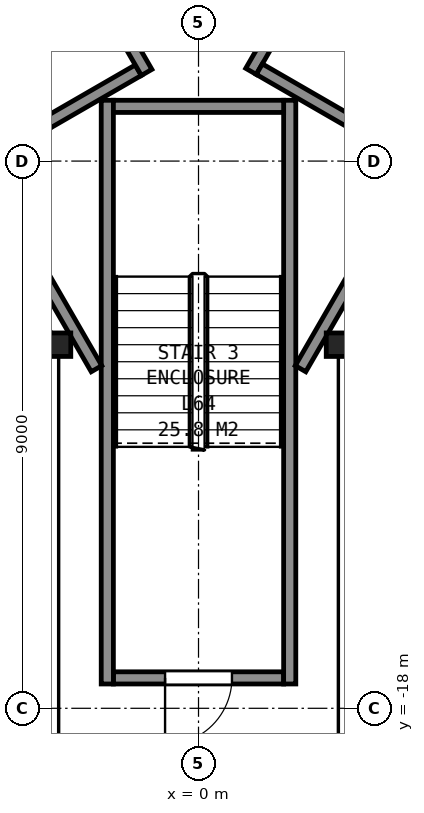
"""IFC4 building model, lengths in metres.
Left out: names, types, materials, properties, quantities, classifications, styles, units other than length and angle.
Written with IfcOpenShell. Run it as: python <this file> out.ifc"""

import sys

from ifc_helpers import new_model, si_unit, direction, frame, frame_2d, origin, origin_2d, place, context, subcontext, project, spatial, rectangle, i_section, extrude, element, fill, save


model = new_model("IFC4")
c1 = context("Model", 3, precision=1e-05, world=origin(), true_north=direction((0.0, 1.0)))
c2 = subcontext(c1, "Body", "Model", "MODEL_VIEW")
j1 = project(units=[si_unit("LENGTHUNIT", "METRE"), si_unit("PLANEANGLEUNIT", "RADIAN")], contexts=[c1])
p1 = place(None, origin())
s1 = spatial("IfcSite", under=j1, at=p1, CompositionType="ELEMENT")
p2 = place(p1, origin())
s2 = spatial("IfcBuilding", under=s1, at=p2, CompositionType="ELEMENT")
p3 = place(p2, frame((0.0, 0.0, 254.5)))
s3 = spatial("IfcBuildingStorey", under=s2, at=p3, CompositionType="ELEMENT", Elevation=254.5)
for number, where, z_axis, x_axis in (
    (1, (-2.3, -12.02, 0.0), (0.0, 0.0, 1.0), (1.0, 0.0, 0.0)),
    (2, (2.3, -12.02, 0.0), (0.0, 0.0, 1.0), (1.0, 0.0, 0.0)),
):
    element("IfcColumn", number, at=place(p3, frame(where, z_axis=z_axis, x_axis=x_axis)), inside=s3, PredefinedType="COLUMN", context=c2, shape_type="SweptSolid", body=[
        extrude(i_section(OverallWidth=0.399, OverallDepth=0.386, WebThickness=0.021, FlangeThickness=0.033, FilletRadius=0.015, at=origin_2d()), origin(), (0.0, 0.0, 1.0), 3.65),
    ])
p4 = place(p3, frame((-1.4, -17.5, 0.0), z_axis=(0.0, 0.0, 1.0), x_axis=(1.0, 0.0, 0.0)))
e3 = element("IfcWall", 3, at=p4, inside=s3, PredefinedType="PARTITIONING", context=c2, shape_type="SweptSolid", body=[
    extrude(rectangle(XDim=2.8, YDim=0.2, at=frame_2d((1.4, 0.0))), origin(), (0.0, 0.0, 1.0), 3.45),
])
p5 = place(p4, frame((0.85, 0.0, 0.0)))
e4 = element("IfcOpeningElement", 4, at=p5, cuts=e3, PredefinedType="OPENING", context=c2, shape_type="SweptSolid", body=[
    extrude(rectangle(XDim=1.1, YDim=2.1, at=frame_2d((0.55, 1.05))), frame((0.0, 0.11, 0.0), z_axis=(0.0, -1.0, 0.0), x_axis=(1.0, 0.0, 0.0)), (0.0, 0.0, 1.0), 0.22),
])
for number, where, z_axis, x_axis in (
    (5, (1.5, -8.0, 0.0), (0.0, 0.0, 1.0), (0.0, -1.0, 0.0)),
    (6, (-1.5, -8.0, 0.0), (0.0, 0.0, 1.0), (0.0, -1.0, 0.0)),
):
    element("IfcWall", number, at=place(p3, frame(where, z_axis=z_axis, x_axis=x_axis)), inside=s3, PredefinedType="PARTITIONING", context=c2, shape_type="SweptSolid", body=[
        extrude(rectangle(XDim=9.6, YDim=0.2, at=frame_2d((4.8, 0.0))), origin(), (0.0, 0.0, 1.0), 3.45),
    ])
p6 = place(p3, frame((-1.4, -8.1, 0.0), z_axis=(0.0, 0.0, 1.0), x_axis=(1.0, 0.0, 0.0)))
e7 = element("IfcWall", 7, at=p6, inside=s3, PredefinedType="PARTITIONING", context=c2, shape_type="SweptSolid", body=[
    extrude(rectangle(XDim=2.8, YDim=0.2, at=frame_2d((1.4, 0.0))), origin(), (0.0, 0.0, 1.0), 3.45),
])
p7 = place(p3, frame((-2.505, -8.38, 0.0), z_axis=(0.0, 0.0, 1.0), x_axis=(0.866002029911, 0.500040482552, 0.0)))
e8 = element("IfcWall", 8, at=p7, inside=s3, PredefinedType="PARTITIONING", context=c2, shape_type="SweptSolid", body=[
    extrude(rectangle(XDim=1.75, YDim=0.2, at=frame_2d((0.875, 0.0))), origin(), (0.0, 0.0, 1.0), 3.7),
])
p8 = place(p3, frame((-4.62, -7.118, 0.0), z_axis=(0.0, 0.0, 1.0), x_axis=(0.866039495442, 0.49997559174, 0.0)))
e9 = element("IfcWall", 9, at=p8, inside=s3, PredefinedType="PARTITIONING", context=c2, shape_type="SweptSolid", body=[
    extrude(rectangle(XDim=2.95, YDim=0.2, at=frame_2d((1.475, 0.0))), origin(), (0.0, 0.0, 1.0), 3.7),
])
p9 = place(p3, frame((0.863, -7.525, 0.0), z_axis=(0.0, 0.0, 1.0), x_axis=(0.499990435942, 0.866030925526, 0.0)))
e10 = element("IfcWall", 10, at=p9, inside=s3, PredefinedType="PARTITIONING", context=c2, shape_type="SweptSolid", body=[
    extrude(rectangle(XDim=2.55, YDim=0.2, at=frame_2d((1.275, 0.0))), origin(), (0.0, 0.0, 1.0), 3.7),
])
p10 = place(p3, frame((-0.853, -7.542, 0.0), z_axis=(0.0, 0.0, 1.0), x_axis=(-0.500016218704, 0.866016039709, 0.0)))
e11 = element("IfcWall", 11, at=p10, inside=s3, PredefinedType="PARTITIONING", context=c2, shape_type="SweptSolid", body=[
    extrude(rectangle(XDim=2.35, YDim=0.2, at=frame_2d((1.175, 0.0))), origin(), (0.0, 0.0, 1.0), 3.7),
])
p11 = place(p3, frame((2.515, -8.363, 0.0), z_axis=(0.0, 0.0, 1.0), x_axis=(-0.866036909293, 0.499980071345, 0.0)))
e12 = element("IfcWall", 12, at=p11, inside=s3, PredefinedType="PARTITIONING", context=c2, shape_type="SweptSolid", body=[
    extrude(rectangle(XDim=1.75, YDim=0.2, at=frame_2d((0.875, 0.0))), origin(), (0.0, 0.0, 1.0), 3.7),
])
p12 = place(p3, frame((-4.655, -7.257, 0.0), z_axis=(0.0, 0.0, 1.0), x_axis=(0.499966124405, -0.866044960985, 0.0)))
e13 = element("IfcWall", 13, at=p12, inside=s3, PredefinedType="PARTITIONING", context=c2, shape_type="SweptSolid", body=[
    extrude(rectangle(XDim=5.956, YDim=0.2, at=frame_2d((2.978, 0.0))), origin(), (0.0, 0.0, 1.0), 3.45),
])
p13 = place(p3, frame((1.677, -12.415, 0.0), z_axis=(0.0, 0.0, 1.0), x_axis=(0.500054337157, 0.865994029939, 0.0)))
e14 = element("IfcWall", 14, at=p13, inside=s3, PredefinedType="PARTITIONING", context=c2, shape_type="SweptSolid", body=[
    extrude(rectangle(XDim=6.177, YDim=0.2, at=frame_2d((3.088, 0.0))), origin(), (0.0, 0.0, 1.0), 3.45),
])
p14 = place(p13, frame((3.695, 0.0, 0.0)))
e15 = element("IfcOpeningElement", 15, at=p14, cuts=e14, PredefinedType="OPENING", context=c2, shape_type="SweptSolid", body=[
    extrude(rectangle(XDim=1.8, YDim=2.1, at=frame_2d((0.9, 1.05))), frame((0.0, 0.11, 0.0), z_axis=(0.0, -1.0, 0.0), x_axis=(1.0, 0.0, 0.0)), (0.0, 0.0, 1.0), 0.22),
])
p15 = place(p5, origin())
e16 = element("IfcDoor", 16, at=p15, inside=s3, OperationType="SINGLE_SWING_LEFT", PredefinedType="DOOR", context=c2, shape_type="SweptSolid", body=[
    extrude(rectangle(XDim=1.1, YDim=2.1, at=frame_2d((0.55, 1.05))), frame((0.0, 0.025, 0.0), z_axis=(0.0, -1.0, 0.0), x_axis=(1.0, 0.0, 0.0)), (0.0, 0.0, 1.0), 0.05),
])
fill(e4, e16)
save(model, sys.argv[1])
